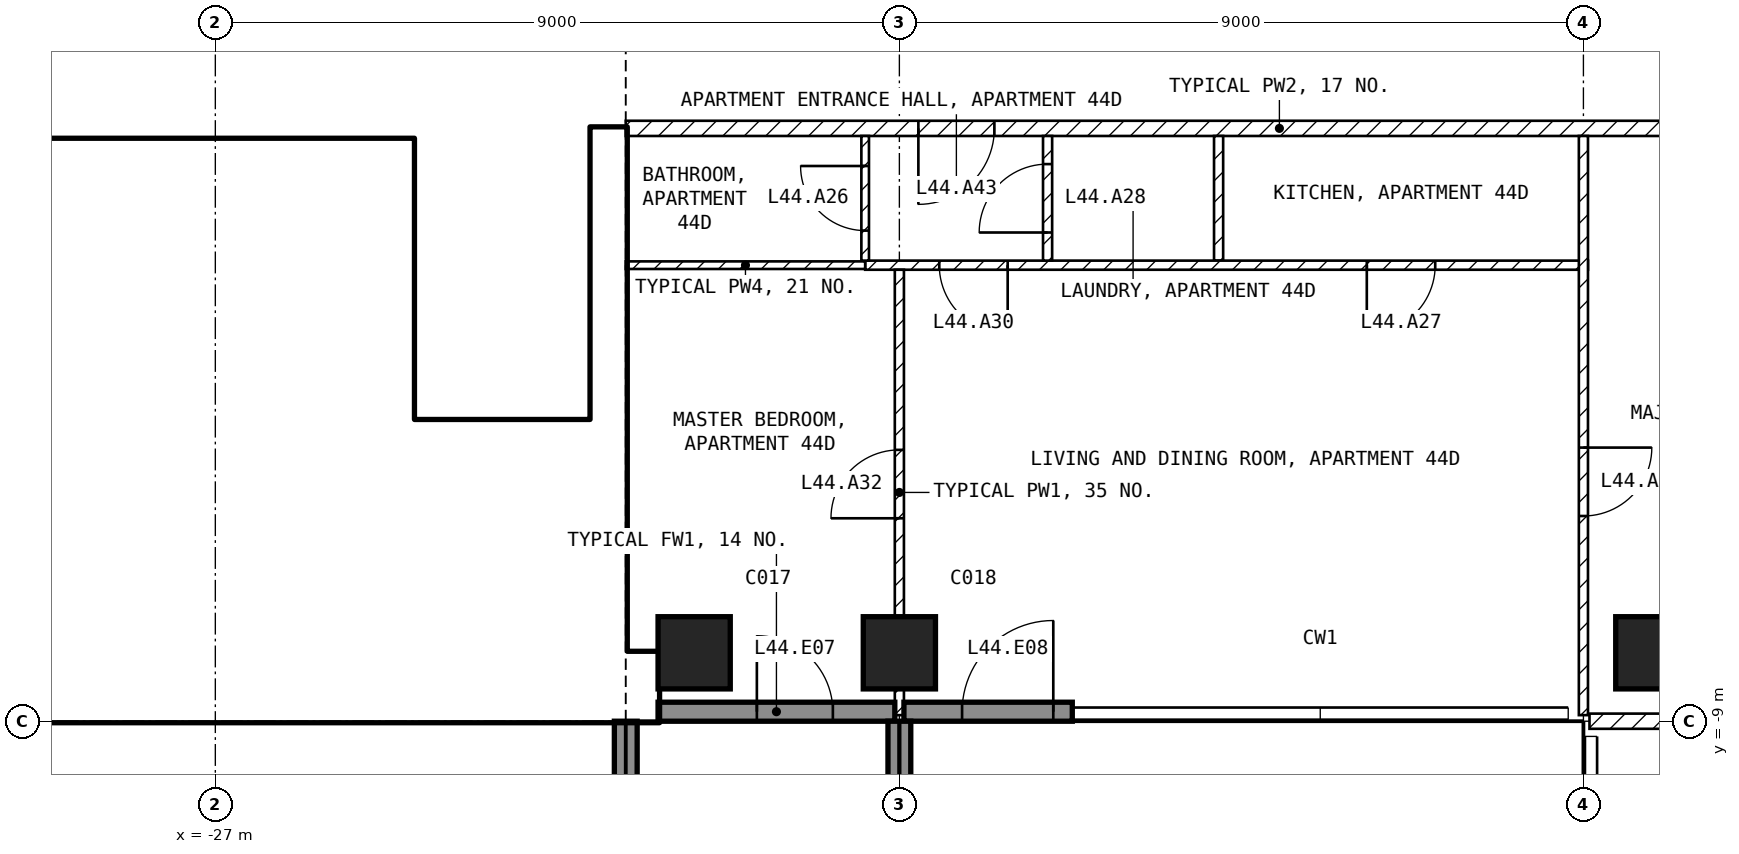
"""IFC4 building model, lengths in metres.
Left out: names, types, materials, properties, quantities, classifications, styles, units other than length and angle.
Written with IfcOpenShell. Run it as: python <this file> out.ifc"""

import sys

from ifc_helpers import new_model, si_unit, direction, frame, frame_2d, origin, origin_2d, place, context, subcontext, project, spatial, rectangle, extrude, element, fill, save


model = new_model("IFC4")
c1 = context("Model", 3, precision=1e-05, world=origin(), true_north=direction((0.0, 1.0)))
c2 = subcontext(c1, "Body", "Model", "MODEL_VIEW")
j1 = project(units=[si_unit("LENGTHUNIT", "METRE"), si_unit("PLANEANGLEUNIT", "RADIAN")], contexts=[c1])
p1 = place(None, origin())
s1 = spatial("IfcSite", under=j1, at=p1, CompositionType="ELEMENT")
p2 = place(p1, origin())
s2 = spatial("IfcBuilding", under=s1, at=p2, CompositionType="ELEMENT")
p3 = place(p2, frame((0.0, 0.0, 180.6)))
s3 = spatial("IfcBuildingStorey", under=s2, at=p3, CompositionType="ELEMENT", Elevation=180.6)
for number, where, z_axis, x_axis in (
    (1, (-20.7, -8.1, -0.25), (0.0, 0.0, 1.0), (1.0, 0.0, 0.0)),
    (2, (-18.0, -8.1, -0.25), (0.0, 0.0, 1.0), (1.0, 0.0, 0.0)),
    (3, (-8.1, -8.1, -0.25), (0.0, 0.0, 1.0), (1.0, 0.0, 0.0)),
):
    element("IfcColumn", number, at=place(p3, frame(where, z_axis=z_axis, x_axis=x_axis)), inside=s3, PredefinedType="COLUMN", context=c2, shape_type="SweptSolid", body=[
        extrude(rectangle(XDim=0.95, YDim=0.95, at=origin_2d()), origin(), (0.0, 0.0, 1.0), 3.5),
    ])
p4 = place(p3, frame((-21.175, -8.875, 0.0), z_axis=(0.0, 0.0, 1.0), x_axis=(1.0, 0.0, 0.0)))
e4 = element("IfcWall", 4, at=p4, inside=s3, PredefinedType="SOLIDWALL", context=c2, shape_type="SweptSolid", body=[
    extrude(rectangle(XDim=3.115, YDim=0.25, at=frame_2d((1.558, 0.0))), origin(), (0.0, 0.0, 1.0), 3.25),
])
p5 = place(p4, frame((1.3, 0.0, 0.0)))
e5 = element("IfcOpeningElement", 5, at=p5, cuts=e4, PredefinedType="OPENING", context=c2, shape_type="SweptSolid", body=[
    extrude(rectangle(XDim=1.0, YDim=2.4, at=frame_2d((0.5, 1.2))), frame((0.0, 0.135, 0.0), z_axis=(0.0, -1.0, 0.0), x_axis=(1.0, 0.0, 0.0)), (0.0, 0.0, 1.0), 0.27),
])
p6 = place(p3, frame((-17.94, -8.875, 0.0), z_axis=(0.0, 0.0, 1.0), x_axis=(1.0, 0.0, 0.0)))
e6 = element("IfcWall", 6, at=p6, inside=s3, PredefinedType="SOLIDWALL", context=c2, shape_type="SweptSolid", body=[
    extrude(rectangle(XDim=2.215, YDim=0.25, at=frame_2d((1.107, 0.0))), origin(), (0.0, 0.0, 1.0), 3.25),
])
p7 = place(p6, frame((0.765, 0.0, 0.0)))
e7 = element("IfcOpeningElement", 7, at=p7, cuts=e6, PredefinedType="OPENING", context=c2, shape_type="SweptSolid", body=[
    extrude(rectangle(XDim=1.2, YDim=2.4, at=frame_2d((0.6, 1.2))), frame((0.0, 0.135, 0.0), z_axis=(0.0, -1.0, 0.0), x_axis=(1.0, 0.0, 0.0)), (0.0, 0.0, 1.0), 0.27),
])
for number, where, z_axis, x_axis in (
    (8, (-21.6, -9.0, 0.0), (0.0, 0.0, 1.0), (0.0, -1.0, 0.0)),
    (9, (-18.0, -9.0, 0.0), (0.0, 0.0, 1.0), (0.0, -1.0, 0.0)),
):
    element("IfcWall", number, at=place(p3, frame(where, z_axis=z_axis, x_axis=x_axis)), inside=s3, PredefinedType="SOLIDWALL", context=c2, shape_type="SweptSolid", body=[
        extrude(rectangle(XDim=2.7, YDim=0.3, at=frame_2d((1.35, 0.0))), origin(), (0.0, 0.0, 1.0), 3.25),
    ])
p8 = place(p3, frame((-30.2, -8.55, 0.0), z_axis=(0.0, 0.0, 1.0), x_axis=(1.0, 0.0, 0.0)))
e10 = element("IfcWall", 10, at=p8, inside=s3, PredefinedType="SHEAR", context=c2, shape_type="SweptSolid", body=[
    extrude(rectangle(XDim=9.025, YDim=0.9, at=frame_2d((4.512, 0.0))), origin(), (0.0, 0.0, 1.0), 3.25),
])
p9 = place(p3, frame((-21.825, -8.1, 0.0), z_axis=(0.0, 0.0, 1.0), x_axis=(0.0, 1.0, 0.0)))
e11 = element("IfcWall", 11, at=p9, inside=s3, PredefinedType="SHEAR", context=c2, shape_type="SweptSolid", body=[
    extrude(rectangle(XDim=6.9, YDim=0.45, at=frame_2d((3.45, 0.0))), origin(), (0.0, 0.0, 1.0), 3.25),
])
p10 = place(p3, frame((-24.5, -5.05, 0.0), z_axis=(0.0, 0.0, 1.0), x_axis=(0.0, 1.0, 0.0)))
e12 = element("IfcWall", 12, at=p10, inside=s3, PredefinedType="SOLIDWALL", context=c2, shape_type="SweptSolid", body=[
    extrude(rectangle(XDim=3.7, YDim=0.2, at=frame_2d((1.85, 0.0))), origin(), (0.0, 0.0, 1.0), 3.25),
])
p11 = place(p10, frame((0.1, 0.0, 0.0)))
e13 = element("IfcOpeningElement", 13, at=p11, cuts=e12, PredefinedType="OPENING", context=c2, shape_type="SweptSolid", body=[
    extrude(rectangle(XDim=0.8, YDim=2.1, at=frame_2d((0.4, 1.05))), frame((0.0, 0.11, 0.0), z_axis=(0.0, -1.0, 0.0), x_axis=(1.0, 0.0, 0.0)), (0.0, 0.0, 1.0), 0.22),
])
p12 = place(p3, frame((-28.35, -5.15, 0.0), z_axis=(0.0, 0.0, 1.0), x_axis=(1.0, 0.0, 0.0)))
e14 = element("IfcWall", 14, at=p12, inside=s3, PredefinedType="SOLIDWALL", context=c2, shape_type="SweptSolid", body=[
    extrude(rectangle(XDim=6.3, YDim=0.2, at=frame_2d((3.15, 0.0))), origin(), (0.0, 0.0, 1.0), 3.25),
])
p13 = place(p12, frame((5.1, 0.0, 0.0)))
e15 = element("IfcOpeningElement", 15, at=p13, cuts=e14, PredefinedType="OPENING", context=c2, shape_type="SweptSolid", body=[
    extrude(rectangle(XDim=1.0, YDim=2.1, at=frame_2d((0.5, 1.05))), frame((0.0, 0.11, 0.0), z_axis=(0.0, -1.0, 0.0), x_axis=(1.0, 0.0, 0.0)), (0.0, 0.0, 1.0), 0.22),
])
p14 = place(p3, frame((-28.25, -8.1, 0.0), z_axis=(0.0, 0.0, 1.0), x_axis=(0.0, 1.0, 0.0)))
e16 = element("IfcWall", 16, at=p14, inside=s3, PredefinedType="SOLIDWALL", context=c2, shape_type="SweptSolid", body=[
    extrude(rectangle(XDim=2.85, YDim=0.2, at=frame_2d((1.425, 0.0))), origin(), (0.0, 0.0, 1.0), 3.25),
])
p15 = place(p3, frame((-33.2, -1.45, 0.0), z_axis=(0.0, 0.0, 1.0), x_axis=(1.0, 0.0, 0.0)))
e17 = element("IfcWall", 17, at=p15, inside=s3, PredefinedType="SOLIDWALL", context=c2, shape_type="SweptSolid", body=[
    extrude(rectangle(XDim=8.6, YDim=0.2, at=frame_2d((4.3, 0.0))), origin(), (0.0, 0.0, 1.0), 3.25),
])
p16 = place(p15, frame((7.2, 0.0, 0.0)))
e18 = element("IfcOpeningElement", 18, at=p16, cuts=e17, PredefinedType="OPENING", context=c2, shape_type="SweptSolid", body=[
    extrude(rectangle(XDim=1.0, YDim=2.1, at=frame_2d((0.5, 1.05))), frame((0.0, 0.11, 0.0), z_axis=(0.0, -1.0, 0.0), x_axis=(1.0, 0.0, 0.0)), (0.0, 0.0, 1.0), 0.22),
])
p17 = place(p15, frame((5.2, 0.0, 0.0)))
e19 = element("IfcOpeningElement", 19, at=p17, cuts=e17, PredefinedType="OPENING", context=c2, shape_type="SweptSolid", body=[
    extrude(rectangle(XDim=1.0, YDim=2.1, at=frame_2d((0.5, 1.05))), frame((0.0, 0.11, 0.0), z_axis=(0.0, -1.0, 0.0), x_axis=(1.0, 0.0, 0.0)), (0.0, 0.0, 1.0), 0.22),
])
p18 = place(p15, frame((3.2, 0.0, 0.0)))
e20 = element("IfcOpeningElement", 20, at=p18, cuts=e17, PredefinedType="OPENING", context=c2, shape_type="SweptSolid", body=[
    extrude(rectangle(XDim=1.0, YDim=2.1, at=frame_2d((0.5, 1.05))), frame((0.0, 0.11, 0.0), z_axis=(0.0, -1.0, 0.0), x_axis=(1.0, 0.0, 0.0)), (0.0, 0.0, 1.0), 0.22),
])
p19 = place(p15, frame((0.85, 0.0, 0.0)))
e21 = element("IfcOpeningElement", 21, at=p19, cuts=e17, PredefinedType="OPENING", context=c2, shape_type="SweptSolid", body=[
    extrude(rectangle(XDim=0.9, YDim=2.1, at=frame_2d((0.45, 1.05))), frame((0.0, 0.11, 0.0), z_axis=(0.0, -1.0, 0.0), x_axis=(1.0, 0.0, 0.0)), (0.0, 0.0, 1.0), 0.22),
])
p20 = place(p3, frame((-33.2, -3.95, 0.0), z_axis=(0.0, 0.0, 1.0), x_axis=(1.0, 0.0, 0.0)))
e22 = element("IfcWall", 22, at=p20, inside=s3, PredefinedType="SOLIDWALL", context=c2, shape_type="SweptSolid", body=[
    extrude(rectangle(XDim=8.6, YDim=0.2, at=frame_2d((4.3, 0.0))), origin(), (0.0, 0.0, 1.0), 3.25),
])
for number, where, z_axis, x_axis in (
    (23, (-26.5, -3.85, 0.0), (0.0, 0.0, 1.0), (0.0, 1.0, 0.0)),
    (24, (-28.5, -3.85, 0.0), (0.0, 0.0, 1.0), (0.0, 1.0, 0.0)),
):
    element("IfcWall", number, at=place(p3, frame(where, z_axis=z_axis, x_axis=x_axis)), inside=s3, PredefinedType="SOLIDWALL", context=c2, shape_type="SweptSolid", body=[
        extrude(rectangle(XDim=2.3, YDim=0.2, at=frame_2d((1.15, 0.0))), origin(), (0.0, 0.0, 1.0), 3.25),
    ])
p21 = place(p3, frame((-4.4, -1.2, 0.0), z_axis=(0.0, 0.0, 1.0), x_axis=(-1.0, 0.0, 0.0)))
e25 = element("IfcWall", 25, at=p21, inside=s3, PredefinedType="PARTITIONING", context=c2, shape_type="SweptSolid", body=[
    extrude(rectangle(XDim=17.2, YDim=0.2, at=frame_2d((8.6, 0.0))), origin(), (0.0, 0.0, 1.0), 3.25),
])
p22 = place(p21, frame((12.35, 0.0, 0.0)))
e26 = element("IfcOpeningElement", 26, at=p22, cuts=e25, PredefinedType="OPENING", context=c2, shape_type="SweptSolid", body=[
    extrude(rectangle(XDim=1.0, YDim=2.1, at=frame_2d((0.5, 1.05))), frame((0.0, 0.11, 0.0), z_axis=(0.0, -1.0, 0.0), x_axis=(1.0, 0.0, 0.0)), (0.0, 0.0, 1.0), 0.22),
])
p23 = place(p3, frame((8.92, -9.0, 0.0), z_axis=(0.0, 0.0, 1.0), x_axis=(-1.0, 0.0, 0.0)))
e27 = element("IfcWall", 27, at=p23, inside=s3, PredefinedType="PARTITIONING", context=c2, shape_type="SweptSolid", body=[
    extrude(rectangle(XDim=17.84, YDim=0.2, at=frame_2d((8.92, 0.0))), origin(), (0.0, 0.0, 1.0), 3.25),
])
p24 = place(p23, frame((8.42, 0.0, 0.0)))
e28 = element("IfcOpeningElement", 28, at=p24, cuts=e27, PredefinedType="OPENING", context=c2, shape_type="SweptSolid", body=[
    extrude(rectangle(XDim=1.0, YDim=2.1, at=frame_2d((0.5, 1.05))), frame((0.0, 0.11, 0.0), z_axis=(0.0, -1.0, 0.0), x_axis=(1.0, 0.0, 0.0)), (0.0, 0.0, 1.0), 0.22),
])
p25 = place(p3, frame((-13.8, -2.94, 0.0), z_axis=(0.0, 0.0, 1.0), x_axis=(0.0, 1.0, 0.0)))
e29 = element("IfcWall", 29, at=p25, inside=s3, PredefinedType="PARTITIONING", context=c2, shape_type="SweptSolid", body=[
    extrude(rectangle(XDim=1.64, YDim=0.12, at=frame_2d((0.82, 0.0))), origin(), (0.0, 0.0, 1.0), 3.25),
])
p26 = place(p3, frame((-8.94, -3.0, 0.0), z_axis=(0.0, 0.0, 1.0), x_axis=(-1.0, 0.0, 0.0)))
e30 = element("IfcWall", 30, at=p26, inside=s3, PredefinedType="PARTITIONING", context=c2, shape_type="SweptSolid", body=[
    extrude(rectangle(XDim=9.51, YDim=0.12, at=frame_2d((4.755, 0.0))), origin(), (0.0, 0.0, 1.0), 3.25),
])
p27 = place(p26, frame((2.01, 0.0, 0.0)))
e31 = element("IfcOpeningElement", 31, at=p27, cuts=e30, PredefinedType="OPENING", context=c2, shape_type="SweptSolid", body=[
    extrude(rectangle(XDim=0.9, YDim=2.1, at=frame_2d((0.45, 1.05))), frame((0.0, 0.07, 0.0), z_axis=(0.0, -1.0, 0.0), x_axis=(1.0, 0.0, 0.0)), (0.0, 0.0, 1.0), 0.14),
])
p28 = place(p26, frame((7.635, 0.0, 0.0)))
e32 = element("IfcOpeningElement", 32, at=p28, cuts=e30, PredefinedType="OPENING", context=c2, shape_type="SweptSolid", body=[
    extrude(rectangle(XDim=0.9, YDim=2.1, at=frame_2d((0.45, 1.05))), frame((0.0, 0.07, 0.0), z_axis=(0.0, -1.0, 0.0), x_axis=(1.0, 0.0, 0.0)), (0.0, 0.0, 1.0), 0.14),
])
p29 = place(p3, frame((-9.0, -1.3, 0.0), z_axis=(0.0, 0.0, 1.0), x_axis=(0.0, -1.0, 0.0)))
e33 = element("IfcWall", 33, at=p29, inside=s3, PredefinedType="PARTITIONING", context=c2, shape_type="SweptSolid", body=[
    extrude(rectangle(XDim=7.62, YDim=0.12, at=frame_2d((3.81, 0.0))), origin(), (0.0, 0.0, 1.0), 3.25),
])
p30 = place(p29, frame((4.1, 0.0, 0.0)))
e34 = element("IfcOpeningElement", 34, at=p30, cuts=e33, PredefinedType="OPENING", context=c2, shape_type="SweptSolid", body=[
    extrude(rectangle(XDim=0.9, YDim=2.1, at=frame_2d((0.45, 1.05))), frame((0.0, 0.07, 0.0), z_axis=(0.0, -1.0, 0.0), x_axis=(1.0, 0.0, 0.0)), (0.0, 0.0, 1.0), 0.14),
])
p31 = place(p3, frame((-16.05, -2.94, 0.0), z_axis=(0.0, 0.0, 1.0), x_axis=(0.0, 1.0, 0.0)))
e35 = element("IfcWall", 35, at=p31, inside=s3, PredefinedType="PARTITIONING", context=c2, shape_type="SweptSolid", body=[
    extrude(rectangle(XDim=1.64, YDim=0.12, at=frame_2d((0.82, 0.0))), origin(), (0.0, 0.0, 1.0), 3.25),
])
p32 = place(p31, frame((0.37, 0.0, 0.0)))
e36 = element("IfcOpeningElement", 36, at=p32, cuts=e35, PredefinedType="OPENING", context=c2, shape_type="SweptSolid", body=[
    extrude(rectangle(XDim=0.9, YDim=2.1, at=frame_2d((0.45, 1.05))), frame((0.0, 0.07, 0.0), z_axis=(0.0, -1.0, 0.0), x_axis=(1.0, 0.0, 0.0)), (0.0, 0.0, 1.0), 0.14),
])
p33 = place(p3, frame((-18.45, -2.94, 0.0), z_axis=(0.0, 0.0, 1.0), x_axis=(0.0, 1.0, 0.0)))
e37 = element("IfcWall", 37, at=p33, inside=s3, PredefinedType="PARTITIONING", context=c2, shape_type="SweptSolid", body=[
    extrude(rectangle(XDim=1.64, YDim=0.1, at=frame_2d((0.82, 0.0))), origin(), (0.0, 0.0, 1.0), 3.25),
])
p34 = place(p33, frame((0.395, 0.0, 0.0)))
e38 = element("IfcOpeningElement", 38, at=p34, cuts=e37, PredefinedType="OPENING", context=c2, shape_type="SweptSolid", body=[
    extrude(rectangle(XDim=0.85, YDim=2.1, at=frame_2d((0.425, 1.05))), frame((0.0, 0.06, 0.0), z_axis=(0.0, -1.0, 0.0), x_axis=(1.0, 0.0, 0.0)), (0.0, 0.0, 1.0), 0.12),
])
p35 = place(p3, frame((-18.45, -3.0, 0.0), z_axis=(0.0, 0.0, 1.0), x_axis=(-1.0, 0.0, 0.0)))
e39 = element("IfcWall", 39, at=p35, inside=s3, PredefinedType="PARTITIONING", context=c2, shape_type="SweptSolid", body=[
    extrude(rectangle(XDim=3.15, YDim=0.1, at=frame_2d((1.575, 0.0))), origin(), (0.0, 0.0, 1.0), 3.25),
])
p36 = place(p3, frame((-18.0, -8.92, 0.0), z_axis=(0.0, 0.0, 1.0), x_axis=(0.0, 1.0, 0.0)))
e40 = element("IfcWall", 40, at=p36, inside=s3, PredefinedType="PARTITIONING", context=c2, shape_type="SweptSolid", body=[
    extrude(rectangle(XDim=5.86, YDim=0.12, at=frame_2d((2.93, 0.0))), origin(), (0.0, 0.0, 1.0), 2.48),
])
p37 = place(p36, frame((2.59, 0.0, 0.0)))
e41 = element("IfcOpeningElement", 41, at=p37, cuts=e40, PredefinedType="OPENING", context=c2, shape_type="SweptSolid", body=[
    extrude(rectangle(XDim=0.9, YDim=2.1, at=frame_2d((0.45, 1.05))), frame((0.0, 0.07, 0.0), z_axis=(0.0, -1.0, 0.0), x_axis=(1.0, 0.0, 0.0)), (0.0, 0.0, 1.0), 0.14),
])
p38 = place(p5, origin())
e42 = element("IfcDoor", 42, at=p38, inside=s3, OperationType="SINGLE_SWING_LEFT", PredefinedType="DOOR", context=c2, shape_type="SweptSolid", body=[
    extrude(rectangle(XDim=1.0, YDim=2.4, at=frame_2d((0.5, 1.2))), frame((0.0, 0.025, 0.0), z_axis=(0.0, -1.0, 0.0), x_axis=(1.0, 0.0, 0.0)), (0.0, 0.0, 1.0), 0.05),
])
fill(e5, e42)
p39 = place(p7, origin())
e43 = element("IfcDoor", 43, at=p39, inside=s3, OperationType="SINGLE_SWING_RIGHT", PredefinedType="DOOR", context=c2, shape_type="SweptSolid", body=[
    extrude(rectangle(XDim=1.2, YDim=2.4, at=frame_2d((0.6, 1.2))), frame((0.0, 0.025, 0.0), z_axis=(0.0, -1.0, 0.0), x_axis=(1.0, 0.0, 0.0)), (0.0, 0.0, 1.0), 0.05),
])
fill(e7, e43)
p40 = place(p16, origin())
e44 = element("IfcDoor", 44, at=p40, inside=s3, OperationType="DOUBLE_DOOR_SLIDING", PredefinedType="DOOR", context=c2, shape_type="SweptSolid", body=[
    extrude(rectangle(XDim=1.0, YDim=2.1, at=frame_2d((0.5, 1.05))), frame((0.0, 0.025, 0.0), z_axis=(0.0, -1.0, 0.0), x_axis=(1.0, 0.0, 0.0)), (0.0, 0.0, 1.0), 0.05),
])
fill(e18, e44)
p41 = place(p17, origin())
e45 = element("IfcDoor", 45, at=p41, inside=s3, OperationType="DOUBLE_DOOR_SLIDING", PredefinedType="DOOR", context=c2, shape_type="SweptSolid", body=[
    extrude(rectangle(XDim=1.0, YDim=2.1, at=frame_2d((0.5, 1.05))), frame((0.0, 0.025, 0.0), z_axis=(0.0, -1.0, 0.0), x_axis=(1.0, 0.0, 0.0)), (0.0, 0.0, 1.0), 0.05),
])
fill(e19, e45)
p42 = place(p18, origin())
e46 = element("IfcDoor", 46, at=p42, inside=s3, OperationType="DOUBLE_DOOR_SLIDING", PredefinedType="DOOR", context=c2, shape_type="SweptSolid", body=[
    extrude(rectangle(XDim=1.0, YDim=2.1, at=frame_2d((0.5, 1.05))), frame((0.0, 0.025, 0.0), z_axis=(0.0, -1.0, 0.0), x_axis=(1.0, 0.0, 0.0)), (0.0, 0.0, 1.0), 0.05),
])
fill(e20, e46)
p43 = place(p13, origin())
e47 = element("IfcDoor", 47, at=p43, inside=s3, OperationType="SINGLE_SWING_LEFT", PredefinedType="DOOR", context=c2, shape_type="SweptSolid", body=[
    extrude(rectangle(XDim=1.0, YDim=2.1, at=frame_2d((0.5, 1.05))), frame((0.0, 0.025, 0.0), z_axis=(0.0, -1.0, 0.0), x_axis=(1.0, 0.0, 0.0)), (0.0, 0.0, 1.0), 0.05),
])
fill(e15, e47)
p44 = place(p11, origin())
e48 = element("IfcDoor", 48, at=p44, inside=s3, OperationType="SINGLE_SWING_LEFT", PredefinedType="DOOR", context=c2, shape_type="SweptSolid", body=[
    extrude(rectangle(XDim=0.8, YDim=2.1, at=frame_2d((0.4, 1.05))), frame((0.0, 0.025, 0.0), z_axis=(0.0, -1.0, 0.0), x_axis=(1.0, 0.0, 0.0)), (0.0, 0.0, 1.0), 0.05),
])
fill(e13, e48)
p45 = place(p34, origin())
e49 = element("IfcDoor", 49, at=p45, inside=s3, OperationType="SINGLE_SWING_RIGHT", PredefinedType="DOOR", context=c2, shape_type="SweptSolid", body=[
    extrude(rectangle(XDim=0.85, YDim=2.1, at=frame_2d((0.425, 1.05))), frame((0.0, 0.025, 0.0), z_axis=(0.0, -1.0, 0.0), x_axis=(1.0, 0.0, 0.0)), (0.0, 0.0, 1.0), 0.05),
])
fill(e38, e49)
p46 = place(p27, origin())
e50 = element("IfcDoor", 50, at=p46, inside=s3, OperationType="SINGLE_SWING_RIGHT", PredefinedType="DOOR", context=c2, shape_type="SweptSolid", body=[
    extrude(rectangle(XDim=0.9, YDim=2.1, at=frame_2d((0.45, 1.05))), frame((0.0, 0.025, 0.0), z_axis=(0.0, -1.0, 0.0), x_axis=(1.0, 0.0, 0.0)), (0.0, 0.0, 1.0), 0.05),
])
fill(e31, e50)
p47 = place(p32, origin())
e51 = element("IfcDoor", 51, at=p47, inside=s3, OperationType="SINGLE_SWING_LEFT", PredefinedType="DOOR", context=c2, shape_type="SweptSolid", body=[
    extrude(rectangle(XDim=0.9, YDim=2.1, at=frame_2d((0.45, 1.05))), frame((0.0, 0.025, 0.0), z_axis=(0.0, -1.0, 0.0), x_axis=(1.0, 0.0, 0.0)), (0.0, 0.0, 1.0), 0.05),
])
fill(e36, e51)
p48 = place(p28, origin())
e52 = element("IfcDoor", 52, at=p48, inside=s3, OperationType="SINGLE_SWING_LEFT", PredefinedType="DOOR", context=c2, shape_type="SweptSolid", body=[
    extrude(rectangle(XDim=0.9, YDim=2.1, at=frame_2d((0.45, 1.05))), frame((0.0, 0.025, 0.0), z_axis=(0.0, -1.0, 0.0), x_axis=(1.0, 0.0, 0.0)), (0.0, 0.0, 1.0), 0.05),
])
fill(e32, e52)
p49 = place(p30, origin())
e53 = element("IfcDoor", 53, at=p49, inside=s3, OperationType="SINGLE_SWING_LEFT", PredefinedType="DOOR", context=c2, shape_type="SweptSolid", body=[
    extrude(rectangle(XDim=0.9, YDim=2.1, at=frame_2d((0.45, 1.05))), frame((0.0, 0.025, 0.0), z_axis=(0.0, -1.0, 0.0), x_axis=(1.0, 0.0, 0.0)), (0.0, 0.0, 1.0), 0.05),
])
fill(e34, e53)
p50 = place(p37, origin())
e54 = element("IfcDoor", 54, at=p50, inside=s3, OperationType="SINGLE_SWING_LEFT", PredefinedType="DOOR", context=c2, shape_type="SweptSolid", body=[
    extrude(rectangle(XDim=0.9, YDim=2.1, at=frame_2d((0.45, 1.05))), frame((0.0, 0.025, 0.0), z_axis=(0.0, -1.0, 0.0), x_axis=(1.0, 0.0, 0.0)), (0.0, 0.0, 1.0), 0.05),
])
fill(e41, e54)
p51 = place(p22, origin())
e55 = element("IfcDoor", 55, at=p51, inside=s3, OperationType="SINGLE_SWING_RIGHT", PredefinedType="DOOR", context=c2, shape_type="SweptSolid", body=[
    extrude(rectangle(XDim=1.0, YDim=2.1, at=frame_2d((0.5, 1.05))), frame((0.0, 0.025, 0.0), z_axis=(0.0, -1.0, 0.0), x_axis=(1.0, 0.0, 0.0)), (0.0, 0.0, 1.0), 0.05),
])
fill(e26, e55)
save(model, sys.argv[1])
